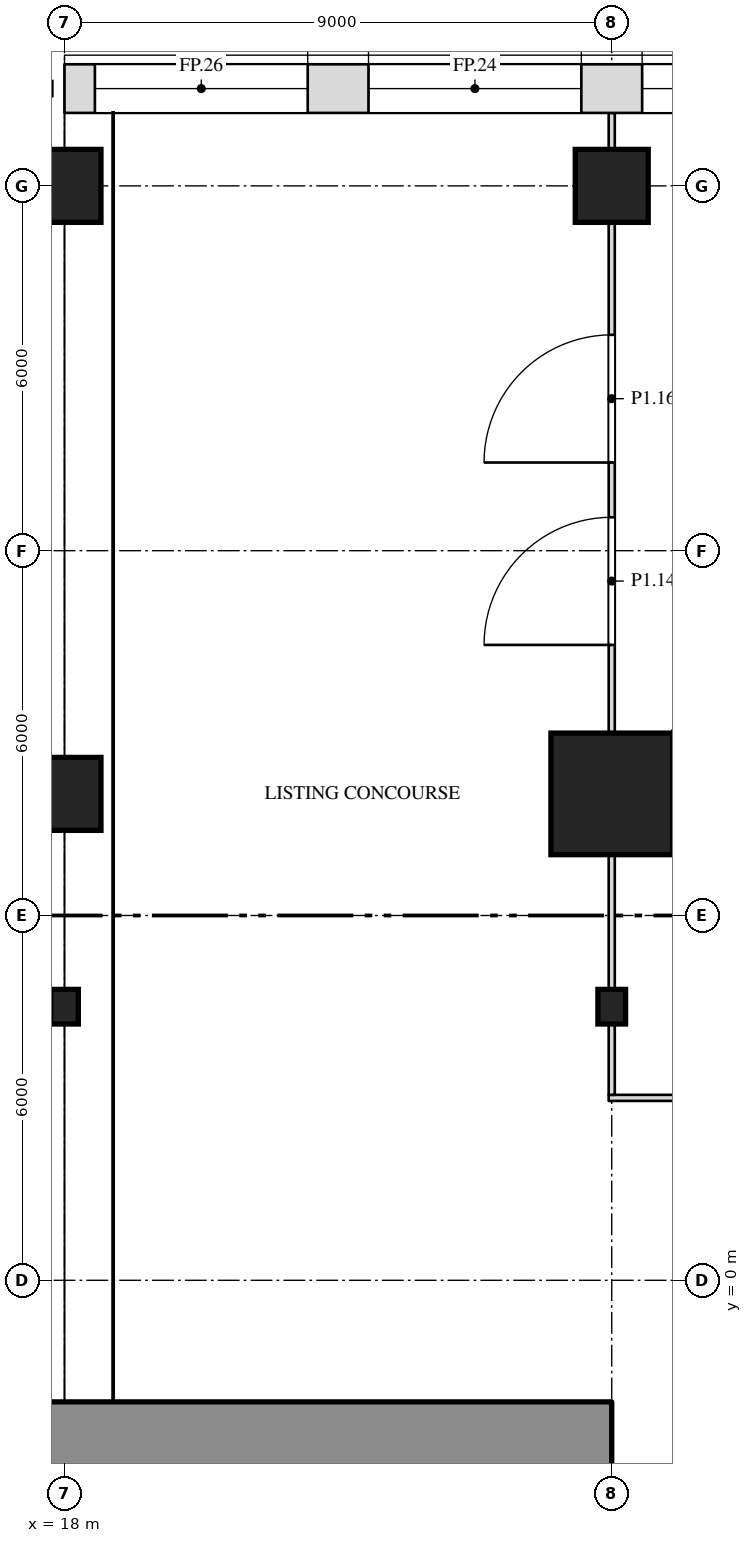
"""IFC4 building model, lengths in metres.
Left out: names, types, materials, properties, quantities, classifications, styles, units other than length and angle.
Written with IfcOpenShell. Run it as: python <this file> out.ifc"""

import sys

from ifc_helpers import new_model, si_unit, direction, frame, frame_2d, origin, origin_2d, place, context, subcontext, project, spatial, rectangle, i_section, extrude, element, fill, save


model = new_model("IFC4")
c1 = context("Model", 3, precision=1e-05, world=origin(), true_north=direction((0.0, 1.0)))
c2 = subcontext(c1, "Body", "Model", "MODEL_VIEW")
j1 = project(units=[si_unit("LENGTHUNIT", "METRE"), si_unit("PLANEANGLEUNIT", "RADIAN")], contexts=[c1])
p1 = place(None, origin())
s1 = spatial("IfcSite", under=j1, at=p1, CompositionType="ELEMENT")
p2 = place(p1, origin())
s2 = spatial("IfcBuilding", under=s1, at=p2, CompositionType="ELEMENT")
p3 = place(p2, frame((0.0, 0.0, 9.0)))
s3 = spatial("IfcBuildingStorey", under=s2, at=p3, CompositionType="ELEMENT", Elevation=9.0)
for number, where, z_axis, x_axis in (
    (1, (18.0, 4.5, 0.0), (0.0, 0.0, 1.0), (1.0, 0.0, 0.0)),
    (2, (27.0, 4.5, 0.0), (0.0, 0.0, 1.0), (1.0, 0.0, 0.0)),
):
    element("IfcColumn", number, at=place(p3, frame(where, z_axis=z_axis, x_axis=x_axis)), inside=s3, PredefinedType="COLUMN", context=c2, shape_type="SweptSolid", body=[
        extrude(i_section(OverallWidth=0.455, OverallDepth=0.569, WebThickness=0.078, FlangeThickness=0.125, at=origin_2d()), origin(), (0.0, 0.0, 1.0), 6.0),
    ])
p4 = place(p3, frame((18.0, 8.0, 0.0), z_axis=(0.0, 0.0, 1.0), x_axis=(1.0, 0.0, 0.0)))
e3 = element("IfcColumn", 3, at=p4, inside=s3, PredefinedType="COLUMN", context=c2, shape_type="SweptSolid", body=[
    extrude(rectangle(XDim=1.2, YDim=1.2, at=origin_2d()), origin(), (0.0, 0.0, 1.0), 6.0),
])
p5 = place(p3, frame((27.0, 8.0, 0.0), z_axis=(0.0, 0.0, 1.0), x_axis=(1.0, 0.0, 0.0)))
e4 = element("IfcColumn", 4, at=p5, inside=s3, PredefinedType="COLUMN", context=c2, shape_type="SweptSolid", body=[
    extrude(rectangle(XDim=2.0, YDim=2.0, at=origin_2d()), origin(), (0.0, 0.0, 1.0), 6.0),
])
for number, where, z_axis, x_axis in (
    (5, (18.0, 18.0, 0.0), (0.0, 0.0, 1.0), (1.0, 0.0, 0.0)),
    (6, (27.0, 18.0, 0.0), (0.0, 0.0, 1.0), (1.0, 0.0, 0.0)),
):
    element("IfcColumn", number, at=place(p3, frame(where, z_axis=z_axis, x_axis=x_axis)), inside=s3, PredefinedType="COLUMN", context=c2, shape_type="SweptSolid", body=[
        extrude(rectangle(XDim=1.2, YDim=1.2, at=origin_2d()), origin(), (0.0, 0.0, 1.0), 6.0),
    ])
p6 = place(p3, frame((-27.0, -2.6, 0.0), z_axis=(0.0, 0.0, 1.0), x_axis=(1.0, 0.0, 0.0)))
e7 = element("IfcWall", 7, at=p6, inside=s3, PredefinedType="SHEAR", context=c2, shape_type="SweptSolid", body=[
    extrude(rectangle(XDim=54.0, YDim=1.2, at=frame_2d((27.0, 0.0))), origin(), (0.0, 0.0, 1.0), 5.7),
])
p7 = place(p3, frame((26.95, 3.0, 0.0), z_axis=(0.0, 0.0, 1.0), x_axis=(1.0, 0.0, 0.0)))
e8 = element("IfcWall", 8, at=p7, inside=s3, PredefinedType="PARTITIONING", context=c2, shape_type="SweptSolid", body=[
    extrude(rectangle(XDim=11.25, YDim=0.1, at=frame_2d((5.625, 0.0))), origin(), (0.0, 0.0, 1.0), 5.7),
])
p8 = place(p3, frame((27.0, 3.05, 0.0), z_axis=(0.0, 0.0, 1.0), x_axis=(0.0, 1.0, 0.0)))
e9 = element("IfcWall", 9, at=p8, inside=s3, PredefinedType="PARTITIONING", context=c2, shape_type="SweptSolid", body=[
    extrude(rectangle(XDim=1.166, YDim=0.1, at=frame_2d((0.583, 0.0))), origin(), (0.0, 0.0, 1.0), 5.088),
])
p9 = place(p3, frame((27.0, 4.784, 0.0), z_axis=(0.0, 0.0, 1.0), x_axis=(0.0, 1.0, 0.0)))
e10 = element("IfcWall", 10, at=p9, inside=s3, PredefinedType="PARTITIONING", context=c2, shape_type="SweptSolid", body=[
    extrude(rectangle(XDim=2.216, YDim=0.1, at=frame_2d((1.108, 0.0))), origin(), (0.0, 0.0, 1.0), 5.088),
])
p10 = place(p3, frame((27.0, 9.0, 0.0), z_axis=(0.0, 0.0, 1.0), x_axis=(0.0, 1.0, 0.0)))
e11 = element("IfcWall", 11, at=p10, inside=s3, PredefinedType="PARTITIONING", context=c2, shape_type="SweptSolid", body=[
    extrude(rectangle(XDim=8.4, YDim=0.1, at=frame_2d((4.2, 0.0))), origin(), (0.0, 0.0, 1.0), 5.088),
])
p11 = place(p10, frame((1.45, 0.0, 0.0)))
e12 = element("IfcOpeningElement", 12, at=p11, cuts=e11, PredefinedType="OPENING", context=c2, shape_type="SweptSolid", body=[
    extrude(rectangle(XDim=2.1, YDim=2.4, at=frame_2d((1.05, 1.2))), frame((0.0, 0.062, 0.0), z_axis=(0.0, -1.0, 0.0), x_axis=(1.0, 0.0, 0.0)), (0.0, 0.0, 1.0), 0.124),
])
p12 = place(p10, frame((4.45, 0.0, 0.0)))
e13 = element("IfcOpeningElement", 13, at=p12, cuts=e11, PredefinedType="OPENING", context=c2, shape_type="SweptSolid", body=[
    extrude(rectangle(XDim=2.1, YDim=2.4, at=frame_2d((1.05, 1.2))), frame((0.0, 0.062, 0.0), z_axis=(0.0, -1.0, 0.0), x_axis=(1.0, 0.0, 0.0)), (0.0, 0.0, 1.0), 0.124),
])
p13 = place(p3, frame((27.0, 18.6, 0.0), z_axis=(0.0, 0.0, 1.0), x_axis=(0.0, 1.0, 0.0)))
e14 = element("IfcWall", 14, at=p13, inside=s3, PredefinedType="PARTITIONING", context=c2, shape_type="SweptSolid", body=[
    extrude(rectangle(XDim=0.6, YDim=0.1, at=frame_2d((0.3, 0.0))), origin(), (0.0, 0.0, 1.0), 5.7),
])
p14 = place(p3, frame((32.948, 19.6, 0.0), z_axis=(0.0, 0.0, 1.0), x_axis=(-1.0, 0.0, 0.0)))
e15 = element("IfcWall", 15, at=p14, inside=s3, PredefinedType="SOLIDWALL", context=c2, shape_type="SweptSolid", body=[
    extrude(rectangle(XDim=14.948, YDim=0.8, at=frame_2d((7.474, 0.0))), origin(), (0.0, 0.0, 1.0), 5.7),
])
p15 = place(p14, frame((1.948, 0.0, 1.0)))
e16 = element("IfcOpeningElement", 16, at=p15, cuts=e15, PredefinedType="OPENING", context=c2, shape_type="SweptSolid", body=[
    extrude(rectangle(XDim=3.5, YDim=4.0, at=frame_2d((1.75, 2.0))), frame((0.0, 0.412, 0.0), z_axis=(0.0, -1.0, 0.0), x_axis=(1.0, 0.0, 0.0)), (0.0, 0.0, 1.0), 0.824),
])
p16 = place(p14, frame((6.448, 0.0, 1.0)))
e17 = element("IfcOpeningElement", 17, at=p16, cuts=e15, PredefinedType="OPENING", context=c2, shape_type="SweptSolid", body=[
    extrude(rectangle(XDim=3.5, YDim=4.0, at=frame_2d((1.75, 2.0))), frame((0.0, 0.412, 0.0), z_axis=(0.0, -1.0, 0.0), x_axis=(1.0, 0.0, 0.0)), (0.0, 0.0, 1.0), 0.824),
])
p17 = place(p14, frame((10.948, 0.0, 1.0)))
e18 = element("IfcOpeningElement", 18, at=p17, cuts=e15, PredefinedType="OPENING", context=c2, shape_type="SweptSolid", body=[
    extrude(rectangle(XDim=3.5, YDim=4.0, at=frame_2d((1.75, 2.0))), frame((0.0, 0.412, 0.0), z_axis=(0.0, -1.0, 0.0), x_axis=(1.0, 0.0, 0.0)), (0.0, 0.0, 1.0), 0.824),
])
p18 = place(p11, origin())
e19 = element("IfcDoor", 19, at=p18, inside=s3, OperationType="DOUBLE_DOOR_SINGLE_SWING", PredefinedType="DOOR", context=c2, shape_type="SweptSolid", body=[
    extrude(rectangle(XDim=2.1, YDim=2.4, at=frame_2d((1.05, 1.2))), frame((0.0, 0.025, 0.0), z_axis=(0.0, -1.0, 0.0), x_axis=(1.0, 0.0, 0.0)), (0.0, 0.0, 1.0), 0.05),
])
fill(e12, e19)
p19 = place(p12, origin())
e20 = element("IfcDoor", 20, at=p19, inside=s3, OperationType="DOUBLE_DOOR_SINGLE_SWING", PredefinedType="DOOR", context=c2, shape_type="SweptSolid", body=[
    extrude(rectangle(XDim=2.1, YDim=2.4, at=frame_2d((1.05, 1.2))), frame((0.0, 0.025, 0.0), z_axis=(0.0, -1.0, 0.0), x_axis=(1.0, 0.0, 0.0)), (0.0, 0.0, 1.0), 0.05),
])
fill(e13, e20)
p20 = place(p15, origin())
e21 = element("IfcWindow", 21, at=p20, inside=s3, PartitioningType="SINGLE_PANEL", PredefinedType="WINDOW", context=c2, shape_type="SweptSolid", body=[
    extrude(rectangle(XDim=3.5, YDim=4.0, at=frame_2d((1.75, 2.0))), frame((0.0, 0.03, 0.0), z_axis=(0.0, -1.0, 0.0), x_axis=(1.0, 0.0, 0.0)), (0.0, 0.0, 1.0), 0.06),
])
fill(e16, e21)
p21 = place(p16, origin())
e22 = element("IfcWindow", 22, at=p21, inside=s3, PartitioningType="SINGLE_PANEL", PredefinedType="WINDOW", context=c2, shape_type="SweptSolid", body=[
    extrude(rectangle(XDim=3.5, YDim=4.0, at=frame_2d((1.75, 2.0))), frame((0.0, 0.03, 0.0), z_axis=(0.0, -1.0, 0.0), x_axis=(1.0, 0.0, 0.0)), (0.0, 0.0, 1.0), 0.06),
])
fill(e17, e22)
p22 = place(p17, origin())
e23 = element("IfcWindow", 23, at=p22, inside=s3, PartitioningType="SINGLE_PANEL", PredefinedType="WINDOW", context=c2, shape_type="SweptSolid", body=[
    extrude(rectangle(XDim=3.5, YDim=4.0, at=frame_2d((1.75, 2.0))), frame((0.0, 0.03, 0.0), z_axis=(0.0, -1.0, 0.0), x_axis=(1.0, 0.0, 0.0)), (0.0, 0.0, 1.0), 0.06),
])
fill(e18, e23)
save(model, sys.argv[1])
